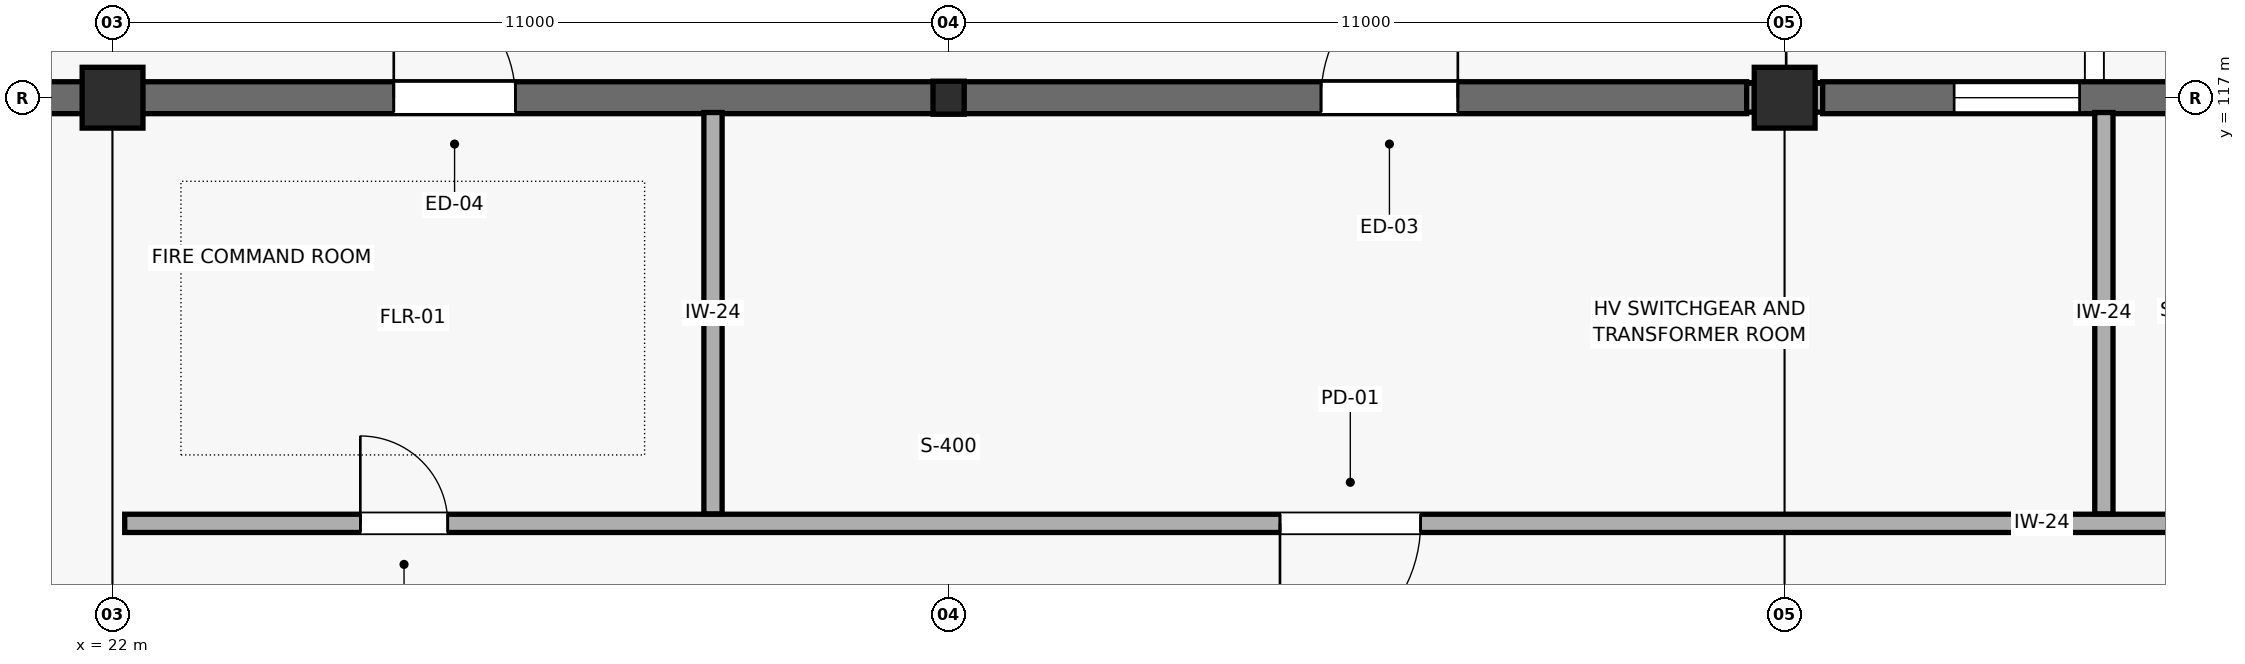
"""IFC4 building model, lengths in metres.
Left out: names, types, materials, properties, quantities, classifications, styles, units other than length and angle.
Written with IfcOpenShell. Run it as: python <this file> out.ifc"""

import sys

from ifc_helpers import new_model, si_unit, direction, frame, frame_2d, origin, origin_2d, place, context, subcontext, project, spatial, rectangle, i_section, extrude, element, fill, save


model = new_model("IFC4")
c1 = context("Model", 3, precision=1e-05, world=origin(), true_north=direction((0.0, 1.0)))
c2 = subcontext(c1, "Body", "Model", "MODEL_VIEW")
j1 = project(units=[si_unit("LENGTHUNIT", "METRE"), si_unit("PLANEANGLEUNIT", "RADIAN")], contexts=[c1])
p1 = place(None, origin())
s1 = spatial("IfcSite", under=j1, at=p1, CompositionType="ELEMENT")
p2 = place(p1, origin())
s2 = spatial("IfcBuilding", under=s1, at=p2, CompositionType="ELEMENT")
p3 = place(p2, origin())
s3 = spatial("IfcBuildingStorey", under=s2, at=p3, CompositionType="ELEMENT", Elevation=0.0)
p4 = place(p3, frame((22.0, 117.0, 0.0), z_axis=(0.0, 0.0, 1.0), x_axis=(1.0, 0.0, 0.0)))
e1 = element("IfcColumn", 1, at=p4, inside=s3, PredefinedType="COLUMN", context=c2, shape_type="SweptSolid", body=[
    extrude(rectangle(XDim=0.8, YDim=0.8, at=origin_2d()), origin(), (0.0, 0.0, 1.0), 5.4),
])
p5 = place(p3, frame((33.0, 117.0, 0.0), z_axis=(0.0, 0.0, 1.0), x_axis=(1.0, 0.0, 0.0)))
e2 = element("IfcColumn", 2, at=p5, inside=s3, PredefinedType="COLUMN", context=c2, shape_type="SweptSolid", body=[
    extrude(i_section(OverallWidth=0.411, OverallDepth=0.434, WebThickness=0.036, FlangeThickness=0.057, at=origin_2d()), origin(), (0.0, 0.0, 1.0), 5.4),
])
p6 = place(p3, frame((44.0, 117.0, 0.0), z_axis=(0.0, 0.0, 1.0), x_axis=(1.0, 0.0, 0.0)))
e3 = element("IfcColumn", 3, at=p6, inside=s3, PredefinedType="COLUMN", context=c2, shape_type="SweptSolid", body=[
    extrude(rectangle(XDim=0.8, YDim=0.8, at=origin_2d()), origin(), (0.0, 0.0, 1.0), 5.4),
])
p7 = place(p3, frame((21.602, 117.0, 0.0), z_axis=(0.0, 0.0, 1.0), x_axis=(-1.0, 0.0, 0.0)))
e4 = element("IfcWall", 4, at=p7, inside=s3, PredefinedType="SOLIDWALL", context=c2, shape_type="SweptSolid", body=[
    extrude(rectangle(XDim=10.586, YDim=0.38, at=frame_2d((5.293, 0.0))), origin(), (0.0, 0.0, 1.0), 4.425),
])
p8 = place(p7, frame((2.102, 0.0, 0.95)))
e5 = element("IfcOpeningElement", 5, at=p8, cuts=e4, PredefinedType="OPENING", context=c2, shape_type="SweptSolid", body=[
    extrude(rectangle(XDim=1.65, YDim=2.25, at=frame_2d((0.825, 1.125))), frame((0.0, 0.2, 0.0), z_axis=(0.0, -1.0, 0.0), x_axis=(1.0, 0.0, 0.0)), (0.0, 0.0, 1.0), 0.4),
])
p9 = place(p7, frame((5.902, 0.0, 0.95)))
e6 = element("IfcOpeningElement", 6, at=p9, cuts=e4, PredefinedType="OPENING", context=c2, shape_type="SweptSolid", body=[
    extrude(rectangle(XDim=1.65, YDim=2.25, at=frame_2d((0.825, 1.125))), frame((0.0, 0.2, 0.0), z_axis=(0.0, -1.0, 0.0), x_axis=(1.0, 0.0, 0.0)), (0.0, 0.0, 1.0), 0.4),
])
p10 = place(p3, frame((32.984, 117.0, 0.0), z_axis=(0.0, 0.0, 1.0), x_axis=(-1.0, 0.0, 0.0)))
e7 = element("IfcWall", 7, at=p10, inside=s3, PredefinedType="SOLIDWALL", context=c2, shape_type="SweptSolid", body=[
    extrude(rectangle(XDim=10.586, YDim=0.38, at=frame_2d((5.293, 0.0))), origin(), (0.0, 0.0, 1.0), 4.425),
])
p11 = place(p10, frame((5.684, 0.0, 0.0)))
e8 = element("IfcOpeningElement", 8, at=p11, cuts=e7, PredefinedType="OPENING", context=c2, shape_type="SweptSolid", body=[
    extrude(rectangle(XDim=1.6, YDim=2.3, at=frame_2d((0.8, 1.15))), frame((0.0, 0.2, 0.0), z_axis=(0.0, -1.0, 0.0), x_axis=(1.0, 0.0, 0.0)), (0.0, 0.0, 1.0), 0.4),
])
p12 = place(p3, frame((43.602, 117.0, 0.0), z_axis=(0.0, 0.0, 1.0), x_axis=(-1.0, 0.0, 0.0)))
e9 = element("IfcWall", 9, at=p12, inside=s3, PredefinedType="SOLIDWALL", context=c2, shape_type="SweptSolid", body=[
    extrude(rectangle(XDim=10.586, YDim=0.38, at=frame_2d((5.293, 0.0))), origin(), (0.0, 0.0, 1.0), 4.425),
])
p13 = place(p12, frame((3.902, 0.0, 0.0)))
e10 = element("IfcOpeningElement", 10, at=p13, cuts=e9, PredefinedType="OPENING", context=c2, shape_type="SweptSolid", body=[
    extrude(rectangle(XDim=1.8, YDim=2.4, at=frame_2d((0.9, 1.2))), frame((0.0, 0.2, 0.0), z_axis=(0.0, -1.0, 0.0), x_axis=(1.0, 0.0, 0.0)), (0.0, 0.0, 1.0), 0.4),
])
p14 = place(p3, frame((54.984, 117.0, 0.0), z_axis=(0.0, 0.0, 1.0), x_axis=(-1.0, 0.0, 0.0)))
e11 = element("IfcWall", 11, at=p14, inside=s3, PredefinedType="SOLIDWALL", context=c2, shape_type="SweptSolid", body=[
    extrude(rectangle(XDim=10.586, YDim=0.38, at=frame_2d((5.293, 0.0))), origin(), (0.0, 0.0, 1.0), 4.425),
])
p15 = place(p14, frame((2.484, 0.0, 0.95)))
e12 = element("IfcOpeningElement", 12, at=p15, cuts=e11, PredefinedType="OPENING", context=c2, shape_type="SweptSolid", body=[
    extrude(rectangle(XDim=1.65, YDim=2.25, at=frame_2d((0.825, 1.125))), frame((0.0, 0.2, 0.0), z_axis=(0.0, -1.0, 0.0), x_axis=(1.0, 0.0, 0.0)), (0.0, 0.0, 1.0), 0.4),
])
p16 = place(p14, frame((7.104, 0.0, 0.95)))
e13 = element("IfcOpeningElement", 13, at=p16, cuts=e11, PredefinedType="OPENING", context=c2, shape_type="SweptSolid", body=[
    extrude(rectangle(XDim=1.65, YDim=2.25, at=frame_2d((0.825, 1.125))), frame((0.0, 0.2, 0.0), z_axis=(0.0, -1.0, 0.0), x_axis=(1.0, 0.0, 0.0)), (0.0, 0.0, 1.0), 0.4),
])
for number, where, z_axis, x_axis in (
    (14, (0.5, 117.0, -1.0), (0.0, 0.0, 1.0), (1.0, 0.0, 0.0)),
    (15, (44.5, 117.0, -1.0), (0.0, 0.0, 1.0), (1.0, 0.0, 0.0)),
):
    element("IfcWall", number, at=place(p3, frame(where, z_axis=z_axis, x_axis=x_axis)), inside=s3, PredefinedType="USERDEFINED", context=c2, shape_type="SweptSolid", body=[
        extrude(rectangle(XDim=43.0, YDim=0.42, at=frame_2d((21.5, 0.0))), origin(), (0.0, 0.0, 1.0), 0.58),
    ])
p17 = place(p3, frame((22.16, 111.4, 0.0), z_axis=(0.0, 0.0, 1.0), x_axis=(1.0, 0.0, 0.0)))
e16 = element("IfcWall", 16, at=p17, inside=s3, PredefinedType="PARTITIONING", context=c2, shape_type="SweptSolid", body=[
    extrude(rectangle(XDim=43.68, YDim=0.24, at=frame_2d((21.84, 0.0))), origin(), (0.0, 0.0, 1.0), 4.525),
])
p18 = place(p17, frame((3.1, 0.0, 0.0)))
e17 = element("IfcOpeningElement", 17, at=p18, cuts=e16, PredefinedType="OPENING", context=c2, shape_type="SweptSolid", body=[
    extrude(rectangle(XDim=1.15, YDim=2.2, at=frame_2d((0.575, 1.1))), frame((0.0, 0.13, 0.0), z_axis=(0.0, -1.0, 0.0), x_axis=(1.0, 0.0, 0.0)), (0.0, 0.0, 1.0), 0.26),
])
p19 = place(p17, frame((15.2, 0.0, 0.0)))
e18 = element("IfcOpeningElement", 18, at=p19, cuts=e16, PredefinedType="OPENING", context=c2, shape_type="SweptSolid", body=[
    extrude(rectangle(XDim=1.85, YDim=2.4, at=frame_2d((0.925, 1.2))), frame((0.0, 0.13, 0.0), z_axis=(0.0, -1.0, 0.0), x_axis=(1.0, 0.0, 0.0)), (0.0, 0.0, 1.0), 0.26),
])
p20 = place(p17, frame((33.4, 0.0, 0.0)))
e19 = element("IfcOpeningElement", 19, at=p20, cuts=e16, PredefinedType="OPENING", context=c2, shape_type="SweptSolid", body=[
    extrude(rectangle(XDim=1.85, YDim=2.4, at=frame_2d((0.925, 1.2))), frame((0.0, 0.13, 0.0), z_axis=(0.0, -1.0, 0.0), x_axis=(1.0, 0.0, 0.0)), (0.0, 0.0, 1.0), 0.26),
])
for number, where, z_axis, x_axis in (
    (20, (29.9, 111.525, 0.0), (0.0, 0.0, 1.0), (0.0, 1.0, 0.0)),
    (21, (48.2, 111.525, 0.0), (0.0, 0.0, 1.0), (0.0, 1.0, 0.0)),
):
    element("IfcWall", number, at=place(p3, frame(where, z_axis=z_axis, x_axis=x_axis)), inside=s3, PredefinedType="PARTITIONING", context=c2, shape_type="SweptSolid", body=[
        extrude(rectangle(XDim=5.28, YDim=0.24, at=frame_2d((2.64, 0.0))), origin(), (0.0, 0.0, 1.0), 4.425),
    ])
p21 = place(p11, frame((1.6, 0.0, 0.0), z_axis=(0.0, 0.0, 1.0), x_axis=(-1.0, 0.0, 0.0)))
e22 = element("IfcDoor", 22, at=p21, inside=s3, OperationType="SINGLE_SWING_LEFT", PredefinedType="DOOR", context=c2, shape_type="SweptSolid", body=[
    extrude(rectangle(XDim=1.6, YDim=2.3, at=frame_2d((0.8, 1.15))), frame((0.0, 0.025, 0.0), z_axis=(0.0, -1.0, 0.0), x_axis=(1.0, 0.0, 0.0)), (0.0, 0.0, 1.0), 0.05),
])
fill(e8, e22)
p22 = place(p13, frame((1.8, 0.0, 0.0), z_axis=(0.0, 0.0, 1.0), x_axis=(-1.0, 0.0, 0.0)))
e23 = element("IfcDoor", 23, at=p22, inside=s3, OperationType="SINGLE_SWING_RIGHT", PredefinedType="DOOR", context=c2, shape_type="SweptSolid", body=[
    extrude(rectangle(XDim=1.8, YDim=2.4, at=frame_2d((0.9, 1.2))), frame((0.0, 0.025, 0.0), z_axis=(0.0, -1.0, 0.0), x_axis=(1.0, 0.0, 0.0)), (0.0, 0.0, 1.0), 0.05),
])
fill(e10, e23)
p23 = place(p16, origin())
e24 = element("IfcWindow", 24, at=p23, inside=s3, PartitioningType="SINGLE_PANEL", PredefinedType="WINDOW", context=c2, shape_type="SweptSolid", body=[
    extrude(rectangle(XDim=1.65, YDim=2.25, at=frame_2d((0.825, 1.125))), frame((0.0, 0.03, 0.0), z_axis=(0.0, -1.0, 0.0), x_axis=(1.0, 0.0, 0.0)), (0.0, 0.0, 1.0), 0.06),
])
fill(e13, e24)
p24 = place(p18, origin())
e25 = element("IfcDoor", 25, at=p24, inside=s3, OperationType="SINGLE_SWING_LEFT", PredefinedType="DOOR", context=c2, shape_type="SweptSolid", body=[
    extrude(rectangle(XDim=1.15, YDim=2.2, at=frame_2d((0.575, 1.1))), frame((0.0, 0.025, 0.0), z_axis=(0.0, -1.0, 0.0), x_axis=(1.0, 0.0, 0.0)), (0.0, 0.0, 1.0), 0.05),
])
fill(e17, e25)
p25 = place(p19, frame((1.85, 0.0, 0.0), z_axis=(0.0, 0.0, 1.0), x_axis=(-1.0, 0.0, 0.0)))
e26 = element("IfcDoor", 26, at=p25, inside=s3, OperationType="SINGLE_SWING_RIGHT", PredefinedType="DOOR", context=c2, shape_type="SweptSolid", body=[
    extrude(rectangle(XDim=1.85, YDim=2.4, at=frame_2d((0.925, 1.2))), frame((0.0, 0.025, 0.0), z_axis=(0.0, -1.0, 0.0), x_axis=(1.0, 0.0, 0.0)), (0.0, 0.0, 1.0), 0.05),
])
fill(e18, e26)
save(model, sys.argv[1])
